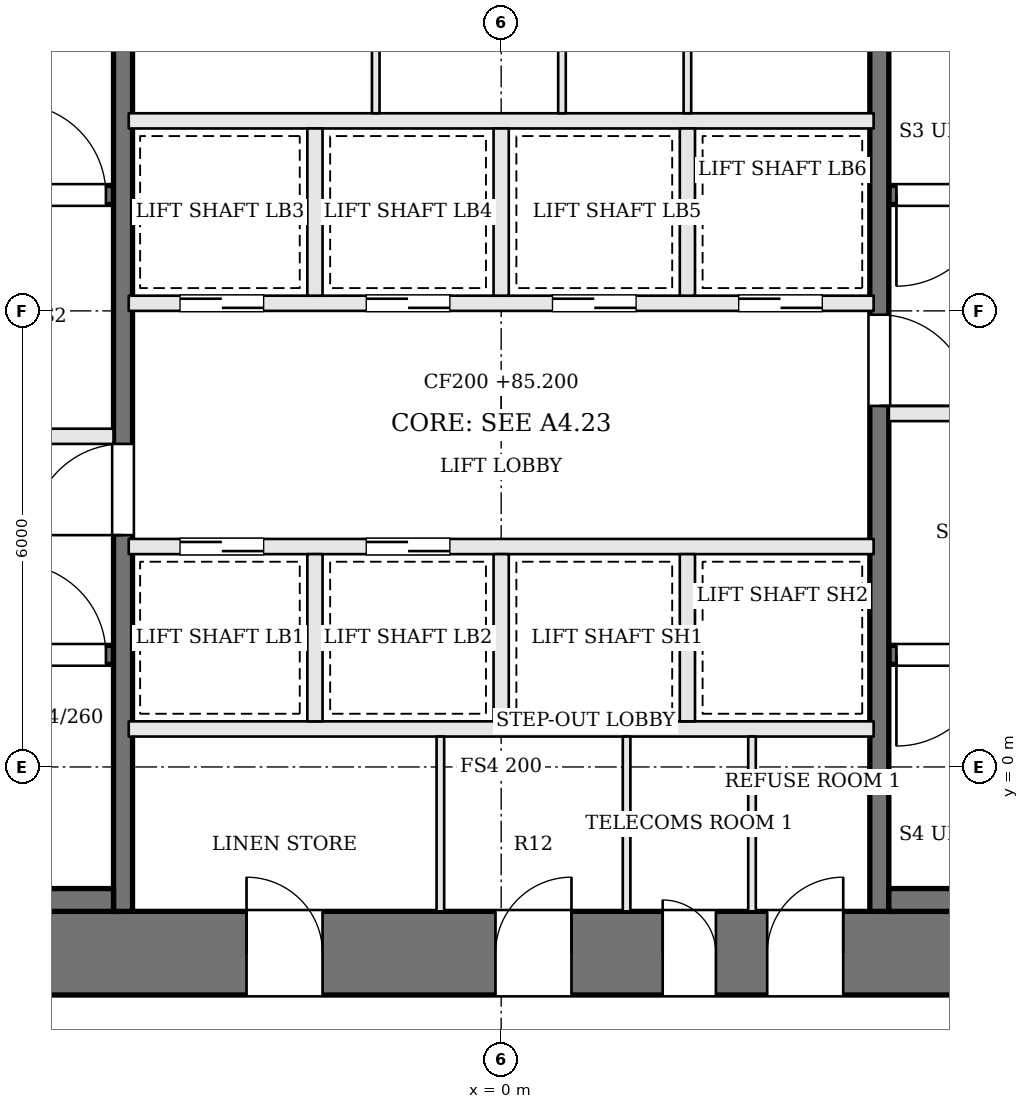
"""IFC4 building model, lengths in metres.
Left out: names, types, materials, properties, quantities, classifications, styles, units other than length and angle.
Written with IfcOpenShell. Run it as: python <this file> out.ifc"""

import sys

from ifc_helpers import new_model, si_unit, direction, frame, frame_2d, origin, place, context, subcontext, project, spatial, rectangle, extrude, element, fill, save


model = new_model("IFC4")
c1 = context("Model", 3, precision=1e-05, world=origin(), true_north=direction((0.0, 1.0)))
c2 = subcontext(c1, "Body", "Model", "MODEL_VIEW")
j1 = project(units=[si_unit("LENGTHUNIT", "METRE"), si_unit("PLANEANGLEUNIT", "RADIAN")], contexts=[c1])
p1 = place(None, origin())
s1 = spatial("IfcSite", under=j1, at=p1, CompositionType="ELEMENT")
p2 = place(p1, origin())
s2 = spatial("IfcBuilding", under=s1, at=p2, CompositionType="ELEMENT")
p3 = place(p2, frame((0.0, 0.0, 85.2)))
s3 = spatial("IfcBuildingStorey", under=s2, at=p3, CompositionType="ELEMENT", Elevation=85.2)
p4 = place(p3, frame((-13.0, -2.45, 0.0), z_axis=(0.0, 0.0, 1.0), x_axis=(1.0, 0.0, 0.0)))
e1 = element("IfcWall", 1, at=p4, inside=s3, PredefinedType="SHEAR", context=c2, shape_type="SweptSolid", body=[
    extrude(rectangle(XDim=26.0, YDim=1.1, at=frame_2d((13.0, 0.0))), origin(), (0.0, 0.0, 1.0), 3.6),
])
p5 = place(p4, frame((9.65, 0.0, 0.0)))
e2 = element("IfcOpeningElement", 2, at=p5, cuts=e1, PredefinedType="OPENING", context=c2, shape_type="SweptSolid", body=[
    extrude(rectangle(XDim=1.0, YDim=2.1, at=frame_2d((0.5, 1.05))), frame((0.0, 0.56, 0.0), z_axis=(0.0, -1.0, 0.0), x_axis=(1.0, 0.0, 0.0)), (0.0, 0.0, 1.0), 1.12),
])
p6 = place(p4, frame((12.925, 0.0, 0.0)))
e3 = element("IfcOpeningElement", 3, at=p6, cuts=e1, PredefinedType="OPENING", context=c2, shape_type="SweptSolid", body=[
    extrude(rectangle(XDim=1.0, YDim=2.1, at=frame_2d((0.5, 1.05))), frame((0.0, 0.56, 0.0), z_axis=(0.0, -1.0, 0.0), x_axis=(1.0, 0.0, 0.0)), (0.0, 0.0, 1.0), 1.12),
])
p7 = place(p4, frame((15.125, 0.0, 0.0)))
e4 = element("IfcOpeningElement", 4, at=p7, cuts=e1, PredefinedType="OPENING", context=c2, shape_type="SweptSolid", body=[
    extrude(rectangle(XDim=0.7, YDim=2.1, at=frame_2d((0.35, 1.05))), frame((0.0, 0.56, 0.0), z_axis=(0.0, -1.0, 0.0), x_axis=(1.0, 0.0, 0.0)), (0.0, 0.0, 1.0), 1.12),
])
p8 = place(p4, frame((16.5, 0.0, 0.0)))
e5 = element("IfcOpeningElement", 5, at=p8, cuts=e1, PredefinedType="OPENING", context=c2, shape_type="SweptSolid", body=[
    extrude(rectangle(XDim=1.0, YDim=2.1, at=frame_2d((0.5, 1.05))), frame((0.0, 0.56, 0.0), z_axis=(0.0, -1.0, 0.0), x_axis=(1.0, 0.0, 0.0)), (0.0, 0.0, 1.0), 1.12),
])
p9 = place(p3, frame((-11.9, 1.475, 0.0), z_axis=(0.0, 0.0, 1.0), x_axis=(1.0, 0.0, 0.0)))
e6 = element("IfcWall", 6, at=p9, inside=s3, PredefinedType="SOLIDWALL", context=c2, shape_type="SweptSolid", body=[
    extrude(rectangle(XDim=6.8, YDim=0.25, at=frame_2d((3.4, 0.0))), origin(), (0.0, 0.0, 1.0), 3.4),
])
p10 = place(p9, frame((5.5, 0.0, 0.0)))
e7 = element("IfcOpeningElement", 7, at=p10, cuts=e6, PredefinedType="OPENING", context=c2, shape_type="SweptSolid", body=[
    extrude(rectangle(XDim=1.2, YDim=2.1, at=frame_2d((0.6, 1.05))), frame((0.0, 0.135, 0.0), z_axis=(0.0, -1.0, 0.0), x_axis=(1.0, 0.0, 0.0)), (0.0, 0.0, 1.0), 0.27),
])
p11 = place(p3, frame((11.9, 7.525, 0.0), z_axis=(0.0, 0.0, 1.0), x_axis=(-1.0, 0.0, 0.0)))
e8 = element("IfcWall", 8, at=p11, inside=s3, PredefinedType="SOLIDWALL", context=c2, shape_type="SweptSolid", body=[
    extrude(rectangle(XDim=6.8, YDim=0.25, at=frame_2d((3.4, 0.0))), origin(), (0.0, 0.0, 1.0), 3.4),
])
p12 = place(p11, frame((5.5, 0.0, 0.0)))
e9 = element("IfcOpeningElement", 9, at=p12, cuts=e8, PredefinedType="OPENING", context=c2, shape_type="SweptSolid", body=[
    extrude(rectangle(XDim=1.2, YDim=2.1, at=frame_2d((0.6, 1.05))), frame((0.0, 0.135, 0.0), z_axis=(0.0, -1.0, 0.0), x_axis=(1.0, 0.0, 0.0)), (0.0, 0.0, 1.0), 0.27),
])
p13 = place(p3, frame((-11.9, 4.35, 0.0), z_axis=(0.0, 0.0, 1.0), x_axis=(1.0, 0.0, 0.0)))
e10 = element("IfcWall", 10, at=p13, inside=s3, PredefinedType="SOLIDWALL", context=c2, shape_type="SweptSolid", body=[
    extrude(rectangle(XDim=6.8, YDim=0.2, at=frame_2d((3.4, 0.0))), origin(), (0.0, 0.0, 1.0), 3.4),
])
p14 = place(p13, frame((4.1, 0.0, 0.0)))
e11 = element("IfcOpeningElement", 11, at=p14, cuts=e10, PredefinedType="OPENING", context=c2, shape_type="SweptSolid", body=[
    extrude(rectangle(XDim=1.2, YDim=2.1, at=frame_2d((0.6, 1.05))), frame((0.0, 0.11, 0.0), z_axis=(0.0, -1.0, 0.0), x_axis=(1.0, 0.0, 0.0)), (0.0, 0.0, 1.0), 0.22),
])
p15 = place(p13, frame((0.8, 0.0, 0.0)))
e12 = element("IfcOpeningElement", 12, at=p15, cuts=e10, PredefinedType="OPENING", context=c2, shape_type="SweptSolid", body=[
    extrude(rectangle(XDim=1.2, YDim=2.1, at=frame_2d((0.6, 1.05))), frame((0.0, 0.11, 0.0), z_axis=(0.0, -1.0, 0.0), x_axis=(1.0, 0.0, 0.0)), (0.0, 0.0, 1.0), 0.22),
])
p16 = place(p3, frame((11.9, 4.65, 0.0), z_axis=(0.0, 0.0, 1.0), x_axis=(-1.0, 0.0, 0.0)))
e13 = element("IfcWall", 13, at=p16, inside=s3, PredefinedType="SOLIDWALL", context=c2, shape_type="SweptSolid", body=[
    extrude(rectangle(XDim=6.8, YDim=0.2, at=frame_2d((3.4, 0.0))), origin(), (0.0, 0.0, 1.0), 3.4),
])
p17 = place(p16, frame((4.1, 0.0, 0.0)))
e14 = element("IfcOpeningElement", 14, at=p17, cuts=e13, PredefinedType="OPENING", context=c2, shape_type="SweptSolid", body=[
    extrude(rectangle(XDim=1.2, YDim=2.1, at=frame_2d((0.6, 1.05))), frame((0.0, 0.11, 0.0), z_axis=(0.0, -1.0, 0.0), x_axis=(1.0, 0.0, 0.0)), (0.0, 0.0, 1.0), 0.22),
])
p18 = place(p16, frame((0.8, 0.0, 0.0)))
e15 = element("IfcOpeningElement", 15, at=p18, cuts=e13, PredefinedType="OPENING", context=c2, shape_type="SweptSolid", body=[
    extrude(rectangle(XDim=1.2, YDim=2.1, at=frame_2d((0.6, 1.05))), frame((0.0, 0.11, 0.0), z_axis=(0.0, -1.0, 0.0), x_axis=(1.0, 0.0, 0.0)), (0.0, 0.0, 1.0), 0.22),
])
p19 = place(p3, frame((-11.9, 7.525, 0.0), z_axis=(0.0, 0.0, 1.0), x_axis=(1.0, 0.0, 0.0)))
e16 = element("IfcWall", 16, at=p19, inside=s3, PredefinedType="SOLIDWALL", context=c2, shape_type="SweptSolid", body=[
    extrude(rectangle(XDim=6.8, YDim=0.25, at=frame_2d((3.4, 0.0))), origin(), (0.0, 0.0, 1.0), 3.4),
])
p20 = place(p19, frame((5.5, 0.0, 0.0)))
e17 = element("IfcOpeningElement", 17, at=p20, cuts=e16, PredefinedType="OPENING", context=c2, shape_type="SweptSolid", body=[
    extrude(rectangle(XDim=1.2, YDim=2.1, at=frame_2d((0.6, 1.05))), frame((0.0, 0.135, 0.0), z_axis=(0.0, -1.0, 0.0), x_axis=(1.0, 0.0, 0.0)), (0.0, 0.0, 1.0), 0.27),
])
p21 = place(p3, frame((11.9, 1.475, 0.0), z_axis=(0.0, 0.0, 1.0), x_axis=(-1.0, 0.0, 0.0)))
e18 = element("IfcWall", 18, at=p21, inside=s3, PredefinedType="SOLIDWALL", context=c2, shape_type="SweptSolid", body=[
    extrude(rectangle(XDim=6.8, YDim=0.25, at=frame_2d((3.4, 0.0))), origin(), (0.0, 0.0, 1.0), 3.4),
])
p22 = place(p21, frame((5.5, 0.0, 0.0)))
e19 = element("IfcOpeningElement", 19, at=p22, cuts=e18, PredefinedType="OPENING", context=c2, shape_type="SweptSolid", body=[
    extrude(rectangle(XDim=1.2, YDim=2.1, at=frame_2d((0.6, 1.05))), frame((0.0, 0.135, 0.0), z_axis=(0.0, -1.0, 0.0), x_axis=(1.0, 0.0, 0.0)), (0.0, 0.0, 1.0), 0.27),
])
p23 = place(p3, frame((-4.975, -1.9, 0.0), z_axis=(0.0, 0.0, 1.0), x_axis=(0.0, 1.0, 0.0)))
e20 = element("IfcWall", 20, at=p23, inside=s3, PredefinedType="SOLIDWALL", context=c2, shape_type="SweptSolid", body=[
    extrude(rectangle(XDim=12.8, YDim=0.25, at=frame_2d((6.4, 0.0))), origin(), (0.0, 0.0, 1.0), 3.4),
])
p24 = place(p23, frame((4.95, 0.0, 0.0)))
e21 = element("IfcOpeningElement", 21, at=p24, cuts=e20, PredefinedType="OPENING", context=c2, shape_type="SweptSolid", body=[
    extrude(rectangle(XDim=1.2, YDim=2.1, at=frame_2d((0.6, 1.05))), frame((0.0, 0.135, 0.0), z_axis=(0.0, -1.0, 0.0), x_axis=(1.0, 0.0, 0.0)), (0.0, 0.0, 1.0), 0.27),
])
p25 = place(p3, frame((4.975, 10.9, 0.0), z_axis=(0.0, 0.0, 1.0), x_axis=(0.0, -1.0, 0.0)))
e22 = element("IfcWall", 22, at=p25, inside=s3, PredefinedType="SOLIDWALL", context=c2, shape_type="SweptSolid", body=[
    extrude(rectangle(XDim=12.8, YDim=0.25, at=frame_2d((6.4, 0.0))), origin(), (0.0, 0.0, 1.0), 3.4),
])
p26 = place(p25, frame((4.95, 0.0, 0.0)))
e23 = element("IfcOpeningElement", 23, at=p26, cuts=e22, PredefinedType="OPENING", context=c2, shape_type="SweptSolid", body=[
    extrude(rectangle(XDim=1.2, YDim=2.1, at=frame_2d((0.6, 1.05))), frame((0.0, 0.135, 0.0), z_axis=(0.0, -1.0, 0.0), x_axis=(1.0, 0.0, 0.0)), (0.0, 0.0, 1.0), 0.27),
])
for number, where, z_axis, x_axis in (
    (24, (-11.9, -1.75, 0.0), (0.0, 0.0, 1.0), (1.0, 0.0, 0.0)),
    (25, (11.9, -1.75, 0.0), (0.0, 0.0, 1.0), (-1.0, 0.0, 0.0)),
):
    element("IfcWall", number, at=place(p3, frame(where, z_axis=z_axis, x_axis=x_axis)), inside=s3, PredefinedType="SOLIDWALL", context=c2, shape_type="SweptSolid", body=[
        extrude(rectangle(XDim=6.8, YDim=0.3, at=frame_2d((3.4, 0.0))), origin(), (0.0, 0.0, 1.0), 3.4),
    ])
p27 = place(p3, frame((-4.9, 0.5, 0.0), z_axis=(0.0, 0.0, 1.0), x_axis=(1.0, 0.0, 0.0)))
e26 = element("IfcWall", 26, at=p27, inside=s3, PredefinedType="SOLIDWALL", context=c2, shape_type="SweptSolid", body=[
    extrude(rectangle(XDim=9.8, YDim=0.2, at=frame_2d((4.9, 0.0))), origin(), (0.0, 0.0, 1.0), 3.4),
])
p28 = place(p3, frame((-4.9, 2.9, 0.0), z_axis=(0.0, 0.0, 1.0), x_axis=(1.0, 0.0, 0.0)))
e27 = element("IfcWall", 27, at=p28, inside=s3, PredefinedType="SOLIDWALL", context=c2, shape_type="SweptSolid", body=[
    extrude(rectangle(XDim=9.8, YDim=0.2, at=frame_2d((4.9, 0.0))), origin(), (0.0, 0.0, 1.0), 3.4),
])
p29 = place(p28, frame((0.675, 0.0, 0.0)))
e28 = element("IfcOpeningElement", 28, at=p29, cuts=e27, PredefinedType="OPENING", context=c2, shape_type="SweptSolid", body=[
    extrude(rectangle(XDim=1.1, YDim=2.1, at=frame_2d((0.55, 1.05))), frame((0.0, 0.11, 0.0), z_axis=(0.0, -1.0, 0.0), x_axis=(1.0, 0.0, 0.0)), (0.0, 0.0, 1.0), 0.22),
])
p30 = place(p28, frame((3.125, 0.0, 0.0)))
e29 = element("IfcOpeningElement", 29, at=p30, cuts=e27, PredefinedType="OPENING", context=c2, shape_type="SweptSolid", body=[
    extrude(rectangle(XDim=1.1, YDim=2.1, at=frame_2d((0.55, 1.05))), frame((0.0, 0.11, 0.0), z_axis=(0.0, -1.0, 0.0), x_axis=(1.0, 0.0, 0.0)), (0.0, 0.0, 1.0), 0.22),
])
p31 = place(p3, frame((-4.9, 6.1, 0.0), z_axis=(0.0, 0.0, 1.0), x_axis=(1.0, 0.0, 0.0)))
e30 = element("IfcWall", 30, at=p31, inside=s3, PredefinedType="SOLIDWALL", context=c2, shape_type="SweptSolid", body=[
    extrude(rectangle(XDim=9.8, YDim=0.2, at=frame_2d((4.9, 0.0))), origin(), (0.0, 0.0, 1.0), 3.4),
])
p32 = place(p31, frame((0.675, 0.0, 0.0)))
e31 = element("IfcOpeningElement", 31, at=p32, cuts=e30, PredefinedType="OPENING", context=c2, shape_type="SweptSolid", body=[
    extrude(rectangle(XDim=1.1, YDim=2.1, at=frame_2d((0.55, 1.05))), frame((0.0, 0.11, 0.0), z_axis=(0.0, -1.0, 0.0), x_axis=(1.0, 0.0, 0.0)), (0.0, 0.0, 1.0), 0.22),
])
p33 = place(p31, frame((3.125, 0.0, 0.0)))
e32 = element("IfcOpeningElement", 32, at=p33, cuts=e30, PredefinedType="OPENING", context=c2, shape_type="SweptSolid", body=[
    extrude(rectangle(XDim=1.1, YDim=2.1, at=frame_2d((0.55, 1.05))), frame((0.0, 0.11, 0.0), z_axis=(0.0, -1.0, 0.0), x_axis=(1.0, 0.0, 0.0)), (0.0, 0.0, 1.0), 0.22),
])
p34 = place(p31, frame((5.575, 0.0, 0.0)))
e33 = element("IfcOpeningElement", 33, at=p34, cuts=e30, PredefinedType="OPENING", context=c2, shape_type="SweptSolid", body=[
    extrude(rectangle(XDim=1.1, YDim=2.1, at=frame_2d((0.55, 1.05))), frame((0.0, 0.11, 0.0), z_axis=(0.0, -1.0, 0.0), x_axis=(1.0, 0.0, 0.0)), (0.0, 0.0, 1.0), 0.22),
])
p35 = place(p31, frame((8.025, 0.0, 0.0)))
e34 = element("IfcOpeningElement", 34, at=p35, cuts=e30, PredefinedType="OPENING", context=c2, shape_type="SweptSolid", body=[
    extrude(rectangle(XDim=1.1, YDim=2.1, at=frame_2d((0.55, 1.05))), frame((0.0, 0.11, 0.0), z_axis=(0.0, -1.0, 0.0), x_axis=(1.0, 0.0, 0.0)), (0.0, 0.0, 1.0), 0.22),
])
p36 = place(p3, frame((-4.9, 8.5, 0.0), z_axis=(0.0, 0.0, 1.0), x_axis=(1.0, 0.0, 0.0)))
e35 = element("IfcWall", 35, at=p36, inside=s3, PredefinedType="SOLIDWALL", context=c2, shape_type="SweptSolid", body=[
    extrude(rectangle(XDim=9.8, YDim=0.2, at=frame_2d((4.9, 0.0))), origin(), (0.0, 0.0, 1.0), 3.4),
])
for number, where, z_axis, x_axis in (
    (36, (-2.45, 0.6, 0.0), (0.0, 0.0, 1.0), (0.0, 1.0, 0.0)),
    (37, (0.0, 0.6, 0.0), (0.0, 0.0, 1.0), (0.0, 1.0, 0.0)),
    (38, (2.45, 0.6, 0.0), (0.0, 0.0, 1.0), (0.0, 1.0, 0.0)),
    (39, (-2.45, 6.2, 0.0), (0.0, 0.0, 1.0), (0.0, 1.0, 0.0)),
    (40, (0.0, 6.2, 0.0), (0.0, 0.0, 1.0), (0.0, 1.0, 0.0)),
    (41, (2.45, 6.2, 0.0), (0.0, 0.0, 1.0), (0.0, 1.0, 0.0)),
):
    element("IfcWall", number, at=place(p3, frame(where, z_axis=z_axis, x_axis=x_axis)), inside=s3, PredefinedType="SOLIDWALL", context=c2, shape_type="SweptSolid", body=[
        extrude(rectangle(XDim=2.2, YDim=0.2, at=frame_2d((1.1, 0.0))), origin(), (0.0, 0.0, 1.0), 3.4),
    ])
for number, where, z_axis, x_axis in (
    (42, (-0.8, -1.9, 0.0), (0.0, 0.0, 1.0), (0.0, 1.0, 0.0)),
    (43, (1.65, -1.9, 0.0), (0.0, 0.0, 1.0), (0.0, 1.0, 0.0)),
    (44, (3.3, -1.9, 0.0), (0.0, 0.0, 1.0), (0.0, 1.0, 0.0)),
    (45, (-1.65, 8.6, 0.0), (0.0, 0.0, 1.0), (0.0, 1.0, 0.0)),
    (46, (0.8, 8.6, 0.0), (0.0, 0.0, 1.0), (0.0, 1.0, 0.0)),
    (47, (2.45, 8.6, 0.0), (0.0, 0.0, 1.0), (0.0, 1.0, 0.0)),
):
    element("IfcWall", number, at=place(p3, frame(where, z_axis=z_axis, x_axis=x_axis)), inside=s3, PredefinedType="PARTITIONING", context=c2, shape_type="SweptSolid", body=[
        extrude(rectangle(XDim=2.3, YDim=0.1, at=frame_2d((1.15, 0.0))), origin(), (0.0, 0.0, 1.0), 3.4),
    ])
p37 = place(p24, origin())
e48 = element("IfcDoor", 48, at=p37, inside=s3, OperationType="SINGLE_SWING_LEFT", PredefinedType="DOOR", context=c2, shape_type="SweptSolid", body=[
    extrude(rectangle(XDim=1.2, YDim=2.1, at=frame_2d((0.6, 1.05))), frame((0.0, 0.025, 0.0), z_axis=(0.0, -1.0, 0.0), x_axis=(1.0, 0.0, 0.0)), (0.0, 0.0, 1.0), 0.05),
])
fill(e21, e48)
p38 = place(p26, origin())
e49 = element("IfcDoor", 49, at=p38, inside=s3, OperationType="SINGLE_SWING_RIGHT", PredefinedType="DOOR", context=c2, shape_type="SweptSolid", body=[
    extrude(rectangle(XDim=1.2, YDim=2.1, at=frame_2d((0.6, 1.05))), frame((0.0, 0.025, 0.0), z_axis=(0.0, -1.0, 0.0), x_axis=(1.0, 0.0, 0.0)), (0.0, 0.0, 1.0), 0.05),
])
fill(e23, e49)
p39 = place(p10, origin())
e50 = element("IfcDoor", 50, at=p39, inside=s3, OperationType="SINGLE_SWING_LEFT", PredefinedType="DOOR", context=c2, shape_type="SweptSolid", body=[
    extrude(rectangle(XDim=1.2, YDim=2.1, at=frame_2d((0.6, 1.05))), frame((0.0, 0.025, 0.0), z_axis=(0.0, -1.0, 0.0), x_axis=(1.0, 0.0, 0.0)), (0.0, 0.0, 1.0), 0.05),
])
fill(e7, e50)
p40 = place(p12, origin())
e51 = element("IfcDoor", 51, at=p40, inside=s3, OperationType="SINGLE_SWING_RIGHT", PredefinedType="DOOR", context=c2, shape_type="SweptSolid", body=[
    extrude(rectangle(XDim=1.2, YDim=2.1, at=frame_2d((0.6, 1.05))), frame((0.0, 0.025, 0.0), z_axis=(0.0, -1.0, 0.0), x_axis=(1.0, 0.0, 0.0)), (0.0, 0.0, 1.0), 0.05),
])
fill(e9, e51)
p41 = place(p20, origin())
e52 = element("IfcDoor", 52, at=p41, inside=s3, OperationType="SINGLE_SWING_LEFT", PredefinedType="DOOR", context=c2, shape_type="SweptSolid", body=[
    extrude(rectangle(XDim=1.2, YDim=2.1, at=frame_2d((0.6, 1.05))), frame((0.0, 0.025, 0.0), z_axis=(0.0, -1.0, 0.0), x_axis=(1.0, 0.0, 0.0)), (0.0, 0.0, 1.0), 0.05),
])
fill(e17, e52)
p42 = place(p22, origin())
e53 = element("IfcDoor", 53, at=p42, inside=s3, OperationType="SINGLE_SWING_RIGHT", PredefinedType="DOOR", context=c2, shape_type="SweptSolid", body=[
    extrude(rectangle(XDim=1.2, YDim=2.1, at=frame_2d((0.6, 1.05))), frame((0.0, 0.025, 0.0), z_axis=(0.0, -1.0, 0.0), x_axis=(1.0, 0.0, 0.0)), (0.0, 0.0, 1.0), 0.05),
])
fill(e19, e53)
p43 = place(p29, origin())
e54 = element("IfcDoor", 54, at=p43, inside=s3, OperationType="SLIDING_TO_RIGHT", PredefinedType="DOOR", context=c2, shape_type="SweptSolid", body=[
    extrude(rectangle(XDim=1.1, YDim=2.1, at=frame_2d((0.55, 1.05))), frame((0.0, 0.025, 0.0), z_axis=(0.0, -1.0, 0.0), x_axis=(1.0, 0.0, 0.0)), (0.0, 0.0, 1.0), 0.05),
])
fill(e28, e54)
p44 = place(p30, origin())
e55 = element("IfcDoor", 55, at=p44, inside=s3, OperationType="SLIDING_TO_LEFT", PredefinedType="DOOR", context=c2, shape_type="SweptSolid", body=[
    extrude(rectangle(XDim=1.1, YDim=2.1, at=frame_2d((0.55, 1.05))), frame((0.0, 0.025, 0.0), z_axis=(0.0, -1.0, 0.0), x_axis=(1.0, 0.0, 0.0)), (0.0, 0.0, 1.0), 0.05),
])
fill(e29, e55)
p45 = place(p32, origin())
e56 = element("IfcDoor", 56, at=p45, inside=s3, OperationType="SLIDING_TO_RIGHT", PredefinedType="DOOR", context=c2, shape_type="SweptSolid", body=[
    extrude(rectangle(XDim=1.1, YDim=2.1, at=frame_2d((0.55, 1.05))), frame((0.0, 0.025, 0.0), z_axis=(0.0, -1.0, 0.0), x_axis=(1.0, 0.0, 0.0)), (0.0, 0.0, 1.0), 0.05),
])
fill(e31, e56)
p46 = place(p33, origin())
e57 = element("IfcDoor", 57, at=p46, inside=s3, OperationType="SLIDING_TO_LEFT", PredefinedType="DOOR", context=c2, shape_type="SweptSolid", body=[
    extrude(rectangle(XDim=1.1, YDim=2.1, at=frame_2d((0.55, 1.05))), frame((0.0, 0.025, 0.0), z_axis=(0.0, -1.0, 0.0), x_axis=(1.0, 0.0, 0.0)), (0.0, 0.0, 1.0), 0.05),
])
fill(e32, e57)
p47 = place(p34, origin())
e58 = element("IfcDoor", 58, at=p47, inside=s3, OperationType="SLIDING_TO_RIGHT", PredefinedType="DOOR", context=c2, shape_type="SweptSolid", body=[
    extrude(rectangle(XDim=1.1, YDim=2.1, at=frame_2d((0.55, 1.05))), frame((0.0, 0.025, 0.0), z_axis=(0.0, -1.0, 0.0), x_axis=(1.0, 0.0, 0.0)), (0.0, 0.0, 1.0), 0.05),
])
fill(e33, e58)
p48 = place(p35, origin())
e59 = element("IfcDoor", 59, at=p48, inside=s3, OperationType="SLIDING_TO_LEFT", PredefinedType="DOOR", context=c2, shape_type="SweptSolid", body=[
    extrude(rectangle(XDim=1.1, YDim=2.1, at=frame_2d((0.55, 1.05))), frame((0.0, 0.025, 0.0), z_axis=(0.0, -1.0, 0.0), x_axis=(1.0, 0.0, 0.0)), (0.0, 0.0, 1.0), 0.05),
])
fill(e34, e59)
p49 = place(p5, origin())
e60 = element("IfcDoor", 60, at=p49, inside=s3, OperationType="SINGLE_SWING_LEFT", PredefinedType="DOOR", context=c2, shape_type="SweptSolid", body=[
    extrude(rectangle(XDim=1.0, YDim=2.1, at=frame_2d((0.5, 1.05))), frame((0.0, 0.025, 0.0), z_axis=(0.0, -1.0, 0.0), x_axis=(1.0, 0.0, 0.0)), (0.0, 0.0, 1.0), 0.05),
])
fill(e2, e60)
p50 = place(p6, origin())
e61 = element("IfcDoor", 61, at=p50, inside=s3, OperationType="SINGLE_SWING_RIGHT", PredefinedType="DOOR", context=c2, shape_type="SweptSolid", body=[
    extrude(rectangle(XDim=1.0, YDim=2.1, at=frame_2d((0.5, 1.05))), frame((0.0, 0.025, 0.0), z_axis=(0.0, -1.0, 0.0), x_axis=(1.0, 0.0, 0.0)), (0.0, 0.0, 1.0), 0.05),
])
fill(e3, e61)
p51 = place(p7, origin())
e62 = element("IfcDoor", 62, at=p51, inside=s3, OperationType="SINGLE_SWING_LEFT", PredefinedType="DOOR", context=c2, shape_type="SweptSolid", body=[
    extrude(rectangle(XDim=0.7, YDim=2.1, at=frame_2d((0.35, 1.05))), frame((0.0, 0.025, 0.0), z_axis=(0.0, -1.0, 0.0), x_axis=(1.0, 0.0, 0.0)), (0.0, 0.0, 1.0), 0.05),
])
fill(e4, e62)
p52 = place(p8, origin())
e63 = element("IfcDoor", 63, at=p52, inside=s3, OperationType="SINGLE_SWING_RIGHT", PredefinedType="DOOR", context=c2, shape_type="SweptSolid", body=[
    extrude(rectangle(XDim=1.0, YDim=2.1, at=frame_2d((0.5, 1.05))), frame((0.0, 0.025, 0.0), z_axis=(0.0, -1.0, 0.0), x_axis=(1.0, 0.0, 0.0)), (0.0, 0.0, 1.0), 0.05),
])
fill(e5, e63)
save(model, sys.argv[1])
